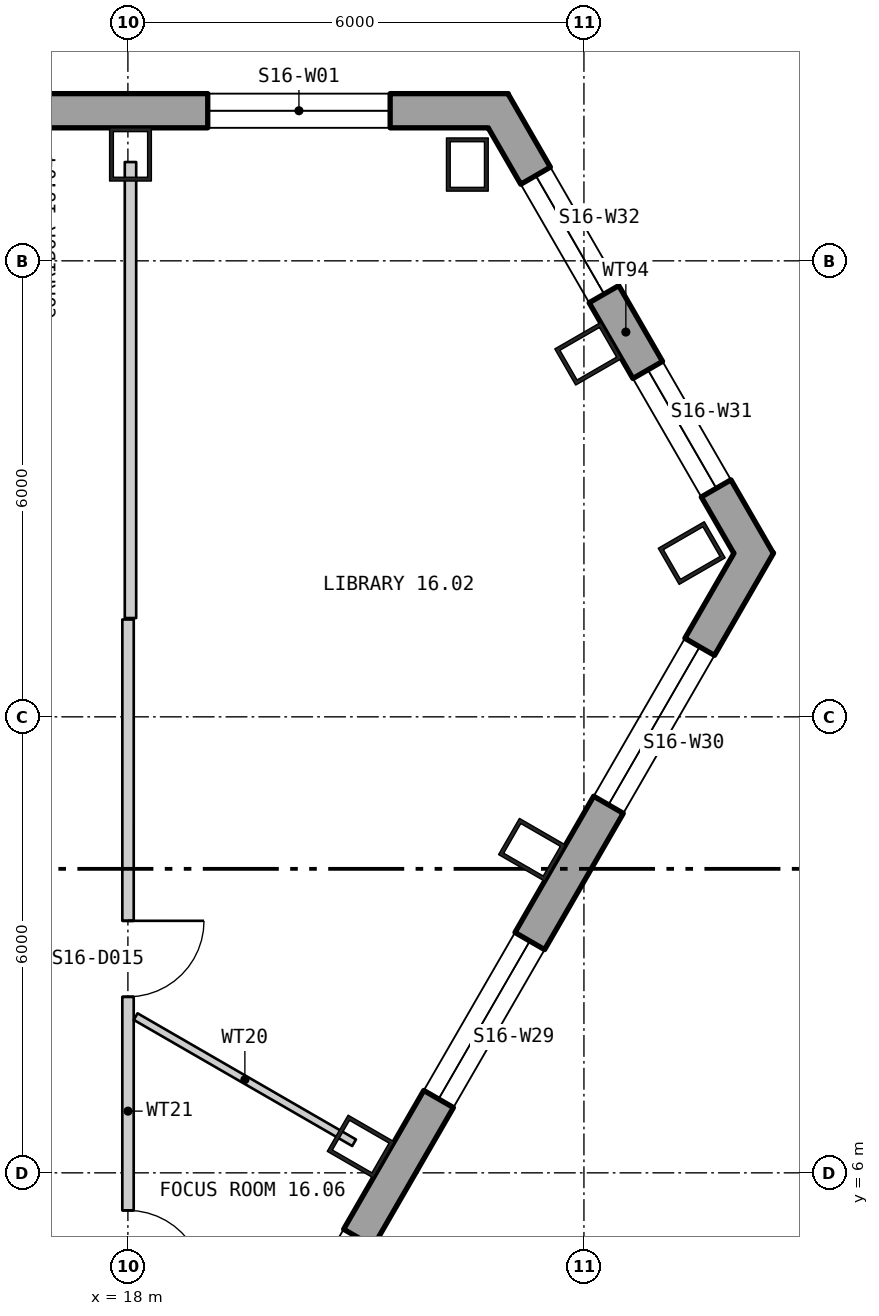
"""IFC4 building model, lengths in metres.
Left out: names, types, materials, properties, quantities, classifications, styles, units other than length and angle.
Written with IfcOpenShell. Run it as: python <this file> out.ifc"""

import sys

from ifc_helpers import new_model, si_unit, direction, frame, frame_2d, origin, origin_2d, place, context, subcontext, project, spatial, polyline, rectangle, hollow_rectangle, outline, extrude, element, fill, save


model = new_model("IFC4")
c1 = context("Model", 3, precision=1e-05, world=origin(), true_north=direction((0.0, 1.0)))
c2 = subcontext(c1, "Body", "Model", "MODEL_VIEW")
j1 = project(units=[si_unit("LENGTHUNIT", "METRE"), si_unit("PLANEANGLEUNIT", "RADIAN")], contexts=[c1])
p1 = place(None, origin())
s1 = spatial("IfcSite", under=j1, at=p1, CompositionType="ELEMENT")
p2 = place(p1, origin())
s2 = spatial("IfcBuilding", under=s1, at=p2, CompositionType="ELEMENT")
p3 = place(p2, frame((0.0, 0.0, 216.0)))
s3 = spatial("IfcBuildingStorey", under=s2, at=p3, CompositionType="ELEMENT", Elevation=216.0)
for number, where, z_axis, x_axis in (
    (1, (22.466, 19.267, 0.0), (0.0, 0.0, 1.0), (-1.0, 0.0, 0.0)),
    (2, (18.034, 19.4, 0.0), (0.0, 0.0, 1.0), (-1.0, 0.0, 0.0)),
    (3, (21.063, 6.346, 0.0), (0.0, 0.0, 1.0), (0.5, 0.866, 0.0)),
    (4, (23.317, 10.251, 0.0), (0.0, 0.0, 1.0), (0.5, 0.866, 0.0)),
    (5, (25.418, 14.155, 0.0), (0.0, 0.0, 1.0), (-0.5, 0.866, 0.0)),
    (6, (24.057, 16.778, 0.0), (0.0, 0.0, 1.0), (-0.5, 0.866, 0.0)),
):
    element("IfcColumn", number, at=place(p3, frame(where, z_axis=z_axis, x_axis=x_axis)), inside=s3, PredefinedType="COLUMN", context=c2, shape_type="SweptSolid", body=[
        extrude(hollow_rectangle(XDim=0.55, YDim=0.7, WallThickness=0.05, at=origin_2d()), origin(), (0.0, 0.0, 1.0), 3.9),
    ])
p4 = place(p3, frame((22.875, 19.975, -0.4), z_axis=(0.0, 0.0, 1.0), x_axis=(-1.0, 0.0, 0.0)))
e7 = element("IfcWall", 7, at=p4, inside=s3, PredefinedType="SOLIDWALL", context=c2, shape_type="SweptSolid", body=[
    extrude(outline(polyline([(-0.13, -0.225), (45.88, -0.225), (45.62, 0.225), (0.13, 0.225), (-0.13, -0.225)])), origin(), (0.0, 0.0, 1.0), 3.9),
])
p5 = place(p4, frame((1.425, 0.0, 1.3)))
e8 = element("IfcOpeningElement", 8, at=p5, cuts=e7, PredefinedType="OPENING", context=c2, shape_type="SweptSolid", body=[
    extrude(rectangle(XDim=2.4, YDim=2.0, at=frame_2d((1.2, 1.0))), frame((0.0, 0.235, 0.0), z_axis=(0.0, -1.0, 0.0), x_axis=(1.0, 0.0, 0.0)), (0.0, 0.0, 1.0), 0.47),
])
p6 = place(p4, frame((10.403, 0.0, 1.3)))
e9 = element("IfcOpeningElement", 9, at=p6, cuts=e7, PredefinedType="OPENING", context=c2, shape_type="SweptSolid", body=[
    extrude(rectangle(XDim=2.4, YDim=2.0, at=frame_2d((1.2, 1.0))), frame((0.0, 0.235, 0.0), z_axis=(0.0, -1.0, 0.0), x_axis=(1.0, 0.0, 0.0)), (0.0, 0.0, 1.0), 0.47),
])
p7 = place(p4, frame((14.912, 0.0, 1.3)))
e10 = element("IfcOpeningElement", 10, at=p7, cuts=e7, PredefinedType="OPENING", context=c2, shape_type="SweptSolid", body=[
    extrude(rectangle(XDim=2.4, YDim=2.0, at=frame_2d((1.2, 1.0))), frame((0.0, 0.235, 0.0), z_axis=(0.0, -1.0, 0.0), x_axis=(1.0, 0.0, 0.0)), (0.0, 0.0, 1.0), 0.47),
])
p8 = place(p4, frame((19.421, 0.0, 1.3)))
e11 = element("IfcOpeningElement", 11, at=p8, cuts=e7, PredefinedType="OPENING", context=c2, shape_type="SweptSolid", body=[
    extrude(rectangle(XDim=2.4, YDim=2.0, at=frame_2d((1.2, 1.0))), frame((0.0, 0.235, 0.0), z_axis=(0.0, -1.0, 0.0), x_axis=(1.0, 0.0, 0.0)), (0.0, 0.0, 1.0), 0.47),
])
p9 = place(p4, frame((23.929, 0.0, 1.3)))
e12 = element("IfcOpeningElement", 12, at=p9, cuts=e7, PredefinedType="OPENING", context=c2, shape_type="SweptSolid", body=[
    extrude(rectangle(XDim=2.4, YDim=2.0, at=frame_2d((1.2, 1.0))), frame((0.0, 0.235, 0.0), z_axis=(0.0, -1.0, 0.0), x_axis=(1.0, 0.0, 0.0)), (0.0, 0.0, 1.0), 0.47),
])
p10 = place(p4, frame((28.438, 0.0, 1.3)))
e13 = element("IfcOpeningElement", 13, at=p10, cuts=e7, PredefinedType="OPENING", context=c2, shape_type="SweptSolid", body=[
    extrude(rectangle(XDim=2.4, YDim=2.0, at=frame_2d((1.2, 1.0))), frame((0.0, 0.235, 0.0), z_axis=(0.0, -1.0, 0.0), x_axis=(1.0, 0.0, 0.0)), (0.0, 0.0, 1.0), 0.47),
])
p11 = place(p4, frame((32.947, 0.0, 1.3)))
e14 = element("IfcOpeningElement", 14, at=p11, cuts=e7, PredefinedType="OPENING", context=c2, shape_type="SweptSolid", body=[
    extrude(rectangle(XDim=2.4, YDim=2.0, at=frame_2d((1.2, 1.0))), frame((0.0, 0.235, 0.0), z_axis=(0.0, -1.0, 0.0), x_axis=(1.0, 0.0, 0.0)), (0.0, 0.0, 1.0), 0.47),
])
p12 = place(p4, frame((37.455, 0.0, 1.3)))
e15 = element("IfcOpeningElement", 15, at=p12, cuts=e7, PredefinedType="OPENING", context=c2, shape_type="SweptSolid", body=[
    extrude(rectangle(XDim=2.4, YDim=2.0, at=frame_2d((1.2, 1.0))), frame((0.0, 0.235, 0.0), z_axis=(0.0, -1.0, 0.0), x_axis=(1.0, 0.0, 0.0)), (0.0, 0.0, 1.0), 0.47),
])
p13 = place(p4, frame((41.925, 0.0, 1.3)))
e16 = element("IfcOpeningElement", 16, at=p13, cuts=e7, PredefinedType="OPENING", context=c2, shape_type="SweptSolid", body=[
    extrude(rectangle(XDim=2.4, YDim=2.0, at=frame_2d((1.2, 1.0))), frame((0.0, 0.235, 0.0), z_axis=(0.0, -1.0, 0.0), x_axis=(1.0, 0.0, 0.0)), (0.0, 0.0, 1.0), 0.47),
])
p14 = place(p3, frame((3.36, -25.466, -0.18), z_axis=(0.0, 0.0, 1.0), x_axis=(0.500000335318, 0.866025210188, 0.0)))
e17 = element("IfcWall", 17, at=p14, inside=s3, PredefinedType="SOLIDWALL", context=c2, shape_type="SweptSolid", body=[
    extrude(outline(polyline([(-0.13, -0.225), (45.88, -0.225), (45.62, 0.225), (0.13, 0.225), (-0.13, -0.225)])), origin(), (0.0, 0.0, 1.0), 3.68),
])
p15 = place(p14, frame((1.425, 0.0, 1.08)))
e18 = element("IfcOpeningElement", 18, at=p15, cuts=e17, PredefinedType="OPENING", context=c2, shape_type="SweptSolid", body=[
    extrude(rectangle(XDim=2.4, YDim=2.0, at=frame_2d((1.2, 1.0))), frame((0.0, 0.235, 0.0), z_axis=(0.0, -1.0, 0.0), x_axis=(1.0, 0.0, 0.0)), (0.0, 0.0, 1.0), 0.47),
])
p16 = place(p14, frame((5.895, 0.0, 1.08)))
e19 = element("IfcOpeningElement", 19, at=p16, cuts=e17, PredefinedType="OPENING", context=c2, shape_type="SweptSolid", body=[
    extrude(rectangle(XDim=2.4, YDim=2.0, at=frame_2d((1.2, 1.0))), frame((0.0, 0.235, 0.0), z_axis=(0.0, -1.0, 0.0), x_axis=(1.0, 0.0, 0.0)), (0.0, 0.0, 1.0), 0.47),
])
p17 = place(p14, frame((10.403, 0.0, 1.08)))
e20 = element("IfcOpeningElement", 20, at=p17, cuts=e17, PredefinedType="OPENING", context=c2, shape_type="SweptSolid", body=[
    extrude(rectangle(XDim=2.4, YDim=2.0, at=frame_2d((1.2, 1.0))), frame((0.0, 0.235, 0.0), z_axis=(0.0, -1.0, 0.0), x_axis=(1.0, 0.0, 0.0)), (0.0, 0.0, 1.0), 0.47),
])
p18 = place(p14, frame((14.912, 0.0, 1.08)))
e21 = element("IfcOpeningElement", 21, at=p18, cuts=e17, PredefinedType="OPENING", context=c2, shape_type="SweptSolid", body=[
    extrude(rectangle(XDim=2.4, YDim=2.0, at=frame_2d((1.2, 1.0))), frame((0.0, 0.235, 0.0), z_axis=(0.0, -1.0, 0.0), x_axis=(1.0, 0.0, 0.0)), (0.0, 0.0, 1.0), 0.47),
])
p19 = place(p14, frame((19.421, 0.0, 1.08)))
e22 = element("IfcOpeningElement", 22, at=p19, cuts=e17, PredefinedType="OPENING", context=c2, shape_type="SweptSolid", body=[
    extrude(rectangle(XDim=2.4, YDim=2.0, at=frame_2d((1.2, 1.0))), frame((0.0, 0.235, 0.0), z_axis=(0.0, -1.0, 0.0), x_axis=(1.0, 0.0, 0.0)), (0.0, 0.0, 1.0), 0.47),
])
p20 = place(p14, frame((23.929, 0.0, 1.08)))
e23 = element("IfcOpeningElement", 23, at=p20, cuts=e17, PredefinedType="OPENING", context=c2, shape_type="SweptSolid", body=[
    extrude(rectangle(XDim=2.4, YDim=2.0, at=frame_2d((1.2, 1.0))), frame((0.0, 0.235, 0.0), z_axis=(0.0, -1.0, 0.0), x_axis=(1.0, 0.0, 0.0)), (0.0, 0.0, 1.0), 0.47),
])
p21 = place(p14, frame((32.947, 0.0, 1.08)))
e24 = element("IfcOpeningElement", 24, at=p21, cuts=e17, PredefinedType="OPENING", context=c2, shape_type="SweptSolid", body=[
    extrude(rectangle(XDim=2.4, YDim=2.0, at=frame_2d((1.2, 1.0))), frame((0.0, 0.235, 0.0), z_axis=(0.0, -1.0, 0.0), x_axis=(1.0, 0.0, 0.0)), (0.0, 0.0, 1.0), 0.47),
])
p22 = place(p14, frame((37.455, 0.0, 1.08)))
e25 = element("IfcOpeningElement", 25, at=p22, cuts=e17, PredefinedType="OPENING", context=c2, shape_type="SweptSolid", body=[
    extrude(rectangle(XDim=2.4, YDim=2.0, at=frame_2d((1.2, 1.0))), frame((0.0, 0.235, 0.0), z_axis=(0.0, -1.0, 0.0), x_axis=(1.0, 0.0, 0.0)), (0.0, 0.0, 1.0), 0.47),
])
p23 = place(p14, frame((41.925, 0.0, 1.08)))
e26 = element("IfcOpeningElement", 26, at=p23, cuts=e17, PredefinedType="OPENING", context=c2, shape_type="SweptSolid", body=[
    extrude(rectangle(XDim=2.4, YDim=2.0, at=frame_2d((1.2, 1.0))), frame((0.0, 0.235, 0.0), z_axis=(0.0, -1.0, 0.0), x_axis=(1.0, 0.0, 0.0)), (0.0, 0.0, 1.0), 0.47),
])
p24 = place(p3, frame((26.231, 14.153, -0.4), z_axis=(0.0, 0.0, 1.0), x_axis=(-0.500004118585, 0.866023025905, 0.0)))
e27 = element("IfcWall", 27, at=p24, inside=s3, PredefinedType="SOLIDWALL", context=c2, shape_type="SweptSolid", body=[
    extrude(outline(polyline([(-0.13, -0.225), (6.85, -0.225), (6.59, 0.225), (0.13, 0.225), (-0.13, -0.225)])), origin(), (0.0, 0.0, 1.0), 3.9),
])
p25 = place(p24, frame((0.984, 0.0, 1.3)))
e28 = element("IfcOpeningElement", 28, at=p25, cuts=e27, PredefinedType="OPENING", context=c2, shape_type="SweptSolid", body=[
    extrude(rectangle(XDim=1.8, YDim=2.0, at=frame_2d((0.9, 1.0))), frame((0.0, 0.235, 0.0), z_axis=(0.0, -1.0, 0.0), x_axis=(1.0, 0.0, 0.0)), (0.0, 0.0, 1.0), 0.47),
])
p26 = place(p24, frame((3.936, 0.0, 1.3)))
e29 = element("IfcOpeningElement", 29, at=p26, cuts=e27, PredefinedType="OPENING", context=c2, shape_type="SweptSolid", body=[
    extrude(rectangle(XDim=1.8, YDim=2.0, at=frame_2d((0.9, 1.0))), frame((0.0, 0.235, 0.0), z_axis=(0.0, -1.0, 0.0), x_axis=(1.0, 0.0, 0.0)), (0.0, 0.0, 1.0), 0.47),
])
p27 = place(p3, frame((18.001, 0.343, 0.0), z_axis=(0.0, 0.0, 1.0), x_axis=(7.7291699e-05, 0.999999997013, 0.0)))
e30 = element("IfcWall", 30, at=p27, inside=s3, PredefinedType="PARTITIONING", context=c2, shape_type="SweptSolid", body=[
    extrude(rectangle(XDim=12.938, YDim=0.15, at=frame_2d((6.469, 0.0))), origin(), (0.0, 0.0, 1.0), 3.7),
])
p28 = place(p27, frame((4.163, 0.0, 0.0)))
e31 = element("IfcOpeningElement", 31, at=p28, cuts=e30, PredefinedType="OPENING", context=c2, shape_type="SweptSolid", body=[
    extrude(rectangle(XDim=1.0, YDim=2.1, at=frame_2d((0.5, 1.05))), frame((0.0, 0.085, 0.0), z_axis=(0.0, -1.0, 0.0), x_axis=(1.0, 0.0, 0.0)), (0.0, 0.0, 1.0), 0.17),
])
p29 = place(p27, frame((7.973, 0.0, 0.0)))
e32 = element("IfcOpeningElement", 32, at=p29, cuts=e30, PredefinedType="OPENING", context=c2, shape_type="SweptSolid", body=[
    extrude(rectangle(XDim=1.0, YDim=2.1, at=frame_2d((0.5, 1.05))), frame((0.0, 0.085, 0.0), z_axis=(0.0, -1.0, 0.0), x_axis=(1.0, 0.0, 0.0)), (0.0, 0.0, 1.0), 0.17),
])
p30 = place(p3, frame((18.034, 13.3, 0.0), z_axis=(0.0, 0.0, 1.0), x_axis=(0.0, 1.0, 0.0)))
e33 = element("IfcWall", 33, at=p30, inside=s3, PredefinedType="PARTITIONING", context=c2, shape_type="SweptSolid", body=[
    extrude(rectangle(XDim=6.0, YDim=0.15, at=frame_2d((3.0, 0.0))), origin(), (0.0, 0.0, 1.0), 3.7),
])
p31 = place(p3, frame((18.102, 8.056, 0.0), z_axis=(0.0, 0.0, 1.0), x_axis=(0.865934672737, -0.500157117865, 0.0)))
e34 = element("IfcWall", 34, at=p31, inside=s3, PredefinedType="PARTITIONING", context=c2, shape_type="SweptSolid", body=[
    extrude(rectangle(XDim=3.319, YDim=0.1, at=frame_2d((1.659, 0.0))), origin(), (0.0, 0.0, 1.0), 3.7),
])
p32 = place(p5, origin())
e35 = element("IfcWindow", 35, at=p32, inside=s3, PartitioningType="SINGLE_PANEL", PredefinedType="WINDOW", context=c2, shape_type="SweptSolid", body=[
    extrude(rectangle(XDim=2.4, YDim=2.0, at=frame_2d((1.2, 1.0))), frame((0.0, 0.105, 0.0), z_axis=(0.0, -1.0, 0.0), x_axis=(1.0, 0.0, 0.0)), (0.0, 0.0, 1.0), 0.06),
])
fill(e8, e35)
p33 = place(p21, origin())
e36 = element("IfcWindow", 36, at=p33, inside=s3, PartitioningType="SINGLE_PANEL", PredefinedType="WINDOW", context=c2, shape_type="SweptSolid", body=[
    extrude(rectangle(XDim=2.4, YDim=2.0, at=frame_2d((1.2, 1.0))), frame((0.0, 0.105, 0.0), z_axis=(0.0, -1.0, 0.0), x_axis=(1.0, 0.0, 0.0)), (0.0, 0.0, 1.0), 0.06),
])
fill(e24, e36)
p34 = place(p22, origin())
e37 = element("IfcWindow", 37, at=p34, inside=s3, PartitioningType="SINGLE_PANEL", PredefinedType="WINDOW", context=c2, shape_type="SweptSolid", body=[
    extrude(rectangle(XDim=2.4, YDim=2.0, at=frame_2d((1.2, 1.0))), frame((0.0, 0.105, 0.0), z_axis=(0.0, -1.0, 0.0), x_axis=(1.0, 0.0, 0.0)), (0.0, 0.0, 1.0), 0.06),
])
fill(e25, e37)
p35 = place(p23, origin())
e38 = element("IfcWindow", 38, at=p35, inside=s3, PartitioningType="SINGLE_PANEL", PredefinedType="WINDOW", context=c2, shape_type="SweptSolid", body=[
    extrude(rectangle(XDim=2.4, YDim=2.0, at=frame_2d((1.2, 1.0))), frame((0.0, 0.105, 0.0), z_axis=(0.0, -1.0, 0.0), x_axis=(1.0, 0.0, 0.0)), (0.0, 0.0, 1.0), 0.06),
])
fill(e26, e38)
p36 = place(p25, origin())
e39 = element("IfcWindow", 39, at=p36, inside=s3, PartitioningType="SINGLE_PANEL", PredefinedType="WINDOW", context=c2, shape_type="SweptSolid", body=[
    extrude(rectangle(XDim=1.8, YDim=2.0, at=frame_2d((0.9, 1.0))), frame((0.0, 0.105, 0.0), z_axis=(0.0, -1.0, 0.0), x_axis=(1.0, 0.0, 0.0)), (0.0, 0.0, 1.0), 0.06),
])
fill(e28, e39)
p37 = place(p26, origin())
e40 = element("IfcWindow", 40, at=p37, inside=s3, PartitioningType="SINGLE_PANEL", PredefinedType="WINDOW", context=c2, shape_type="SweptSolid", body=[
    extrude(rectangle(XDim=1.8, YDim=2.0, at=frame_2d((0.9, 1.0))), frame((0.0, 0.105, 0.0), z_axis=(0.0, -1.0, 0.0), x_axis=(1.0, 0.0, 0.0)), (0.0, 0.0, 1.0), 0.06),
])
fill(e29, e40)
p38 = place(p28, origin())
e41 = element("IfcDoor", 41, at=p38, inside=s3, OperationType="SINGLE_SWING_LEFT", PredefinedType="DOOR", context=c2, shape_type="SweptSolid", body=[
    extrude(rectangle(XDim=1.0, YDim=2.1, at=frame_2d((0.5, 1.05))), frame((0.0, 0.025, 0.0), z_axis=(0.0, -1.0, 0.0), x_axis=(1.0, 0.0, 0.0)), (0.0, 0.0, 1.0), 0.05),
])
fill(e31, e41)
p39 = place(p29, origin())
e42 = element("IfcDoor", 42, at=p39, inside=s3, OperationType="SINGLE_SWING_RIGHT", PredefinedType="DOOR", context=c2, shape_type="SweptSolid", body=[
    extrude(rectangle(XDim=1.0, YDim=2.1, at=frame_2d((0.5, 1.05))), frame((0.0, 0.025, 0.0), z_axis=(0.0, -1.0, 0.0), x_axis=(1.0, 0.0, 0.0)), (0.0, 0.0, 1.0), 0.05),
])
fill(e32, e42)
save(model, sys.argv[1])
